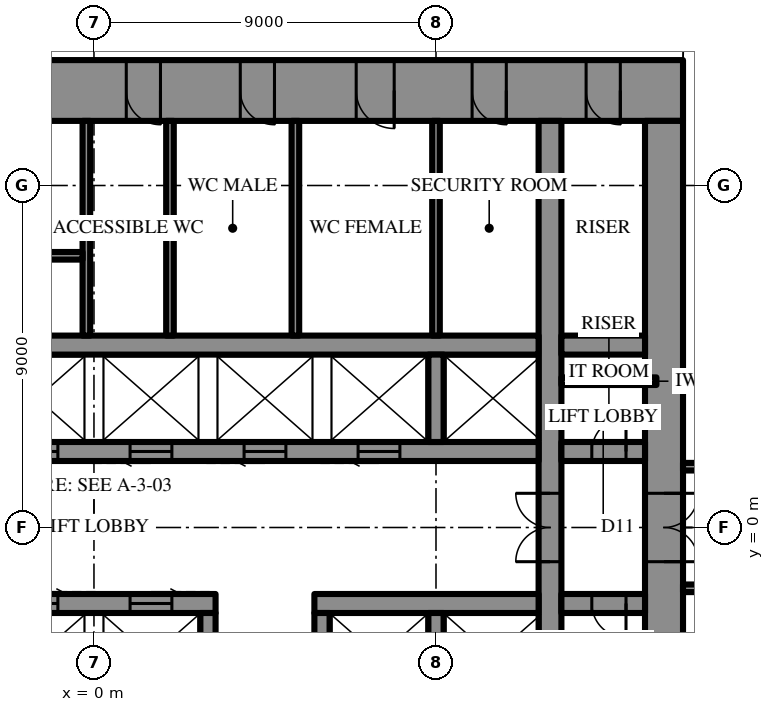
"""IFC4 building model, lengths in metres.
Left out: names, types, materials, properties, quantities, classifications, styles, units other than length and angle.
Written with IfcOpenShell. Run it as: python <this file> out.ifc"""

import sys

from ifc_helpers import new_model, si_unit, direction, frame, frame_2d, origin, place, context, subcontext, project, spatial, rectangle, extrude, element, fill, save


model = new_model("IFC4")
c1 = context("Model", 3, precision=1e-05, world=origin(), true_north=direction((0.0, 1.0)))
c2 = subcontext(c1, "Body", "Model", "MODEL_VIEW")
j1 = project(units=[si_unit("LENGTHUNIT", "METRE"), si_unit("PLANEANGLEUNIT", "RADIAN")], contexts=[c1])
p1 = place(None, origin())
s1 = spatial("IfcSite", under=j1, at=p1, CompositionType="ELEMENT")
p2 = place(p1, origin())
s2 = spatial("IfcBuilding", under=s1, at=p2, CompositionType="ELEMENT")
p3 = place(p2, frame((0.0, 0.0, 282.7)))
s3 = spatial("IfcBuildingStorey", under=s2, at=p3, CompositionType="ELEMENT", Elevation=282.7)
p4 = place(p3, frame((-15.5, 11.5, 0.0), z_axis=(0.0, 0.0, 1.0), x_axis=(1.0, 0.0, 0.0)))
e1 = element("IfcWall", 1, at=p4, inside=s3, PredefinedType="SHEAR", context=c2, shape_type="SweptSolid", body=[
    extrude(rectangle(XDim=31.0, YDim=1.6, at=frame_2d((15.5, 0.0))), origin(), (0.0, 0.0, 1.0), 4.2),
])
p5 = place(p4, frame((16.35, 0.0, 0.0)))
e2 = element("IfcOpeningElement", 2, at=p5, cuts=e1, PredefinedType="OPENING", context=c2, shape_type="SweptSolid", body=[
    extrude(rectangle(XDim=0.9, YDim=2.2, at=frame_2d((0.45, 1.1))), frame((0.0, 0.81, 0.0), z_axis=(0.0, -1.0, 0.0), x_axis=(1.0, 0.0, 0.0)), (0.0, 0.0, 1.0), 1.62),
])
p6 = place(p4, frame((19.35, 0.0, 0.0)))
e3 = element("IfcOpeningElement", 3, at=p6, cuts=e1, PredefinedType="OPENING", context=c2, shape_type="SweptSolid", body=[
    extrude(rectangle(XDim=0.9, YDim=2.2, at=frame_2d((0.45, 1.1))), frame((0.0, 0.81, 0.0), z_axis=(0.0, -1.0, 0.0), x_axis=(1.0, 0.0, 0.0)), (0.0, 0.0, 1.0), 1.62),
])
p7 = place(p4, frame((22.4, 0.0, 0.0)))
e4 = element("IfcOpeningElement", 4, at=p7, cuts=e1, PredefinedType="OPENING", context=c2, shape_type="SweptSolid", body=[
    extrude(rectangle(XDim=1.0, YDim=2.2, at=frame_2d((0.5, 1.1))), frame((0.0, 0.81, 0.0), z_axis=(0.0, -1.0, 0.0), x_axis=(1.0, 0.0, 0.0)), (0.0, 0.0, 1.0), 1.62),
])
p8 = place(p4, frame((1.65, 0.0, 0.0)))
e5 = element("IfcOpeningElement", 5, at=p8, cuts=e1, PredefinedType="OPENING", context=c2, shape_type="SweptSolid", body=[
    extrude(rectangle(XDim=0.9, YDim=2.2, at=frame_2d((0.45, 1.1))), frame((0.0, 0.81, 0.0), z_axis=(0.0, -1.0, 0.0), x_axis=(1.0, 0.0, 0.0)), (0.0, 0.0, 1.0), 1.62),
])
p9 = place(p4, frame((4.65, 0.0, 0.0)))
e6 = element("IfcOpeningElement", 6, at=p9, cuts=e1, PredefinedType="OPENING", context=c2, shape_type="SweptSolid", body=[
    extrude(rectangle(XDim=0.9, YDim=2.2, at=frame_2d((0.45, 1.1))), frame((0.0, 0.81, 0.0), z_axis=(0.0, -1.0, 0.0), x_axis=(1.0, 0.0, 0.0)), (0.0, 0.0, 1.0), 1.62),
])
p10 = place(p4, frame((25.45, 0.0, 0.0)))
e7 = element("IfcOpeningElement", 7, at=p10, cuts=e1, PredefinedType="OPENING", context=c2, shape_type="SweptSolid", body=[
    extrude(rectangle(XDim=0.9, YDim=2.2, at=frame_2d((0.45, 1.1))), frame((0.0, 0.81, 0.0), z_axis=(0.0, -1.0, 0.0), x_axis=(1.0, 0.0, 0.0)), (0.0, 0.0, 1.0), 1.62),
])
p11 = place(p4, frame((28.45, 0.0, 0.0)))
e8 = element("IfcOpeningElement", 8, at=p11, cuts=e1, PredefinedType="OPENING", context=c2, shape_type="SweptSolid", body=[
    extrude(rectangle(XDim=0.9, YDim=2.2, at=frame_2d((0.45, 1.1))), frame((0.0, 0.81, 0.0), z_axis=(0.0, -1.0, 0.0), x_axis=(1.0, 0.0, 0.0)), (0.0, 0.0, 1.0), 1.62),
])
p12 = place(p3, frame((15.0, -10.7, 0.0), z_axis=(0.0, 0.0, 1.0), x_axis=(0.0, 1.0, 0.0)))
e9 = element("IfcWall", 9, at=p12, inside=s3, PredefinedType="SHEAR", context=c2, shape_type="SweptSolid", body=[
    extrude(rectangle(XDim=21.4, YDim=1.0, at=frame_2d((10.7, 0.0))), origin(), (0.0, 0.0, 1.0), 4.2),
])
p13 = place(p12, frame((9.8, 0.0, 0.0)))
e10 = element("IfcOpeningElement", 10, at=p13, cuts=e9, PredefinedType="OPENING", context=c2, shape_type="SweptSolid", body=[
    extrude(rectangle(XDim=1.8, YDim=2.4, at=frame_2d((0.9, 1.2))), frame((0.0, 0.51, 0.0), z_axis=(0.0, -1.0, 0.0), x_axis=(1.0, 0.0, 0.0)), (0.0, 0.0, 1.0), 1.02),
])
p14 = place(p3, frame((12.0, -10.7, 0.0), z_axis=(0.0, 0.0, 1.0), x_axis=(0.0, 1.0, 0.0)))
e11 = element("IfcWall", 11, at=p14, inside=s3, PredefinedType="SHEAR", context=c2, shape_type="SweptSolid", body=[
    extrude(rectangle(XDim=21.4, YDim=0.6, at=frame_2d((10.7, 0.0))), origin(), (0.0, 0.0, 1.0), 4.2),
])
p15 = place(p14, frame((9.8, 0.0, 0.0)))
e12 = element("IfcOpeningElement", 12, at=p15, cuts=e11, PredefinedType="OPENING", context=c2, shape_type="SweptSolid", body=[
    extrude(rectangle(XDim=1.8, YDim=2.4, at=frame_2d((0.9, 1.2))), frame((0.0, 0.31, 0.0), z_axis=(0.0, -1.0, 0.0), x_axis=(1.0, 0.0, 0.0)), (0.0, 0.0, 1.0), 0.62),
])
p16 = place(p3, frame((-3.2, 2.0, 0.0), z_axis=(0.0, 0.0, 1.0), x_axis=(1.0, 0.0, 0.0)))
e13 = element("IfcWall", 13, at=p16, inside=s3, PredefinedType="SHEAR", context=c2, shape_type="SweptSolid", body=[
    extrude(rectangle(XDim=14.9, YDim=0.5, at=frame_2d((7.45, 0.0))), origin(), (0.0, 0.0, 1.0), 4.2),
])
p17 = place(p16, frame((1.15, 0.0, 0.0)))
e14 = element("IfcOpeningElement", 14, at=p17, cuts=e13, PredefinedType="OPENING", context=c2, shape_type="SweptSolid", body=[
    extrude(rectangle(XDim=1.1, YDim=2.2, at=frame_2d((0.55, 1.1))), frame((0.0, 0.26, 0.0), z_axis=(0.0, -1.0, 0.0), x_axis=(1.0, 0.0, 0.0)), (0.0, 0.0, 1.0), 0.52),
])
p18 = place(p16, frame((4.15, 0.0, 0.0)))
e15 = element("IfcOpeningElement", 15, at=p18, cuts=e13, PredefinedType="OPENING", context=c2, shape_type="SweptSolid", body=[
    extrude(rectangle(XDim=1.1, YDim=2.2, at=frame_2d((0.55, 1.1))), frame((0.0, 0.26, 0.0), z_axis=(0.0, -1.0, 0.0), x_axis=(1.0, 0.0, 0.0)), (0.0, 0.0, 1.0), 0.52),
])
p19 = place(p16, frame((7.15, 0.0, 0.0)))
e16 = element("IfcOpeningElement", 16, at=p19, cuts=e13, PredefinedType="OPENING", context=c2, shape_type="SweptSolid", body=[
    extrude(rectangle(XDim=1.1, YDim=2.2, at=frame_2d((0.55, 1.1))), frame((0.0, 0.26, 0.0), z_axis=(0.0, -1.0, 0.0), x_axis=(1.0, 0.0, 0.0)), (0.0, 0.0, 1.0), 0.52),
])
p20 = place(p16, frame((10.15, 0.0, 0.0)))
e17 = element("IfcOpeningElement", 17, at=p20, cuts=e13, PredefinedType="OPENING", context=c2, shape_type="SweptSolid", body=[
    extrude(rectangle(XDim=1.1, YDim=2.2, at=frame_2d((0.55, 1.1))), frame((0.0, 0.26, 0.0), z_axis=(0.0, -1.0, 0.0), x_axis=(1.0, 0.0, 0.0)), (0.0, 0.0, 1.0), 0.52),
])
p21 = place(p3, frame((12.3, 2.0, 0.0), z_axis=(0.0, 0.0, 1.0), x_axis=(1.0, 0.0, 0.0)))
e18 = element("IfcWall", 18, at=p21, inside=s3, PredefinedType="SHEAR", context=c2, shape_type="SweptSolid", body=[
    extrude(rectangle(XDim=2.2, YDim=0.5, at=frame_2d((1.1, 0.0))), origin(), (0.0, 0.0, 1.0), 4.2),
])
p22 = place(p21, frame((0.8, 0.0, 0.0)))
e19 = element("IfcOpeningElement", 19, at=p22, cuts=e18, PredefinedType="OPENING", context=c2, shape_type="SweptSolid", body=[
    extrude(rectangle(XDim=0.9, YDim=2.2, at=frame_2d((0.45, 1.1))), frame((0.0, 0.26, 0.0), z_axis=(0.0, -1.0, 0.0), x_axis=(1.0, 0.0, 0.0)), (0.0, 0.0, 1.0), 0.52),
])
p23 = place(p3, frame((-11.7, 4.8, 0.0), z_axis=(0.0, 0.0, 1.0), x_axis=(1.0, 0.0, 0.0)))
e20 = element("IfcWall", 20, at=p23, inside=s3, PredefinedType="SHEAR", context=c2, shape_type="SweptSolid", body=[
    extrude(rectangle(XDim=23.4, YDim=0.5, at=frame_2d((11.7, 0.0))), origin(), (0.0, 0.0, 1.0), 4.2),
])
p24 = place(p23, frame((6.6, 0.0, 0.0)))
e21 = element("IfcOpeningElement", 21, at=p24, cuts=e20, PredefinedType="OPENING", context=c2, shape_type="SweptSolid", body=[
    extrude(rectangle(XDim=1.2, YDim=2.2, at=frame_2d((0.6, 1.1))), frame((0.0, 0.26, 0.0), z_axis=(0.0, -1.0, 0.0), x_axis=(1.0, 0.0, 0.0)), (0.0, 0.0, 1.0), 0.52),
])
p25 = place(p23, frame((3.6, 0.0, 0.0)))
e22 = element("IfcOpeningElement", 22, at=p25, cuts=e20, PredefinedType="OPENING", context=c2, shape_type="SweptSolid", body=[
    extrude(rectangle(XDim=1.2, YDim=2.2, at=frame_2d((0.6, 1.1))), frame((0.0, 0.26, 0.0), z_axis=(0.0, -1.0, 0.0), x_axis=(1.0, 0.0, 0.0)), (0.0, 0.0, 1.0), 0.52),
])
p26 = place(p3, frame((12.3, 4.8, 0.0), z_axis=(0.0, 0.0, 1.0), x_axis=(1.0, 0.0, 0.0)))
e23 = element("IfcWall", 23, at=p26, inside=s3, PredefinedType="SHEAR", context=c2, shape_type="SweptSolid", body=[
    extrude(rectangle(XDim=2.2, YDim=0.5, at=frame_2d((1.1, 0.0))), origin(), (0.0, 0.0, 1.0), 4.2),
])
p27 = place(p3, frame((9.0, 2.25, 0.0), z_axis=(0.0, 0.0, 1.0), x_axis=(0.0, 1.0, 0.0)))
e24 = element("IfcWall", 24, at=p27, inside=s3, PredefinedType="SHEAR", context=c2, shape_type="SweptSolid", body=[
    extrude(rectangle(XDim=2.3, YDim=0.4, at=frame_2d((1.15, 0.0))), origin(), (0.0, 0.0, 1.0), 4.2),
])
p28 = place(p3, frame((-0.2, 5.05, 0.0), z_axis=(0.0, 0.0, 1.0), x_axis=(0.0, 1.0, 0.0)))
e25 = element("IfcWall", 25, at=p28, inside=s3, PredefinedType="SHEAR", context=c2, shape_type="SweptSolid", body=[
    extrude(rectangle(XDim=5.65, YDim=0.2, at=frame_2d((2.825, 0.0))), origin(), (0.0, 0.0, 1.0), 4.2),
])
p29 = place(p3, frame((-8.9, 7.15, 0.0), z_axis=(0.0, 0.0, 1.0), x_axis=(1.0, 0.0, 0.0)))
e26 = element("IfcWall", 26, at=p29, inside=s3, PredefinedType="SHEAR", context=c2, shape_type="SweptSolid", body=[
    extrude(rectangle(XDim=8.6, YDim=0.2, at=frame_2d((4.3, 0.0))), origin(), (0.0, 0.0, 1.0), 4.2),
])
p30 = place(p29, frame((0.3, 0.0, 0.0)))
e27 = element("IfcOpeningElement", 27, at=p30, cuts=e26, PredefinedType="OPENING", context=c2, shape_type="SweptSolid", body=[
    extrude(rectangle(XDim=1.0, YDim=2.2, at=frame_2d((0.5, 1.1))), frame((0.0, 0.11, 0.0), z_axis=(0.0, -1.0, 0.0), x_axis=(1.0, 0.0, 0.0)), (0.0, 0.0, 1.0), 0.22),
])
p31 = place(p3, frame((14.5, -2.0, 0.0), z_axis=(0.0, 0.0, 1.0), x_axis=(-1.0, 0.0, 0.0)))
e28 = element("IfcWall", 28, at=p31, inside=s3, PredefinedType="SHEAR", context=c2, shape_type="SweptSolid", body=[
    extrude(rectangle(XDim=2.2, YDim=0.5, at=frame_2d((1.1, 0.0))), origin(), (0.0, 0.0, 1.0), 4.2),
])
p32 = place(p31, frame((0.5, 0.0, 0.0)))
e29 = element("IfcOpeningElement", 29, at=p32, cuts=e28, PredefinedType="OPENING", context=c2, shape_type="SweptSolid", body=[
    extrude(rectangle(XDim=0.9, YDim=2.2, at=frame_2d((0.45, 1.1))), frame((0.0, 0.26, 0.0), z_axis=(0.0, -1.0, 0.0), x_axis=(1.0, 0.0, 0.0)), (0.0, 0.0, 1.0), 0.52),
])
p33 = place(p3, frame((11.7, -2.0, 0.0), z_axis=(0.0, 0.0, 1.0), x_axis=(-1.0, 0.0, 0.0)))
e30 = element("IfcWall", 30, at=p33, inside=s3, PredefinedType="SHEAR", context=c2, shape_type="SweptSolid", body=[
    extrude(rectangle(XDim=5.9, YDim=0.5, at=frame_2d((2.95, 0.0))), origin(), (0.0, 0.0, 1.0), 4.2),
])
p34 = place(p3, frame((3.2, -2.0, 0.0), z_axis=(0.0, 0.0, 1.0), x_axis=(-1.0, 0.0, 0.0)))
e31 = element("IfcWall", 31, at=p34, inside=s3, PredefinedType="SHEAR", context=c2, shape_type="SweptSolid", body=[
    extrude(rectangle(XDim=14.9, YDim=0.5, at=frame_2d((7.45, 0.0))), origin(), (0.0, 0.0, 1.0), 4.2),
])
p35 = place(p34, frame((1.15, 0.0, 0.0)))
e32 = element("IfcOpeningElement", 32, at=p35, cuts=e31, PredefinedType="OPENING", context=c2, shape_type="SweptSolid", body=[
    extrude(rectangle(XDim=1.1, YDim=2.2, at=frame_2d((0.55, 1.1))), frame((0.0, 0.26, 0.0), z_axis=(0.0, -1.0, 0.0), x_axis=(1.0, 0.0, 0.0)), (0.0, 0.0, 1.0), 0.52),
])
p36 = place(p34, frame((4.15, 0.0, 0.0)))
e33 = element("IfcOpeningElement", 33, at=p36, cuts=e31, PredefinedType="OPENING", context=c2, shape_type="SweptSolid", body=[
    extrude(rectangle(XDim=1.1, YDim=2.2, at=frame_2d((0.55, 1.1))), frame((0.0, 0.26, 0.0), z_axis=(0.0, -1.0, 0.0), x_axis=(1.0, 0.0, 0.0)), (0.0, 0.0, 1.0), 0.52),
])
p37 = place(p34, frame((7.15, 0.0, 0.0)))
e34 = element("IfcOpeningElement", 34, at=p37, cuts=e31, PredefinedType="OPENING", context=c2, shape_type="SweptSolid", body=[
    extrude(rectangle(XDim=1.1, YDim=2.2, at=frame_2d((0.55, 1.1))), frame((0.0, 0.26, 0.0), z_axis=(0.0, -1.0, 0.0), x_axis=(1.0, 0.0, 0.0)), (0.0, 0.0, 1.0), 0.52),
])
p38 = place(p34, frame((10.15, 0.0, 0.0)))
e35 = element("IfcOpeningElement", 35, at=p38, cuts=e31, PredefinedType="OPENING", context=c2, shape_type="SweptSolid", body=[
    extrude(rectangle(XDim=1.1, YDim=2.2, at=frame_2d((0.55, 1.1))), frame((0.0, 0.26, 0.0), z_axis=(0.0, -1.0, 0.0), x_axis=(1.0, 0.0, 0.0)), (0.0, 0.0, 1.0), 0.52),
])
for number, where, z_axis, x_axis in (
    (36, (9.0, -2.25, 0.0), (0.0, 0.0, 1.0), (0.0, -1.0, 0.0)),
    (37, (6.0, -2.25, 0.0), (0.0, 0.0, 1.0), (0.0, -1.0, 0.0)),
    (38, (3.0, -2.25, 0.0), (0.0, 0.0, 1.0), (0.0, -1.0, 0.0)),
):
    element("IfcWall", number, at=place(p3, frame(where, z_axis=z_axis, x_axis=x_axis)), inside=s3, PredefinedType="SHEAR", context=c2, shape_type="SweptSolid", body=[
        extrude(rectangle(XDim=2.3, YDim=0.4, at=frame_2d((1.15, 0.0))), origin(), (0.0, 0.0, 1.0), 4.2),
    ])
for number, where, z_axis, x_axis in (
    (39, (9.0, 5.05, 0.0), (0.0, 0.0, 1.0), (0.0, 1.0, 0.0)),
    (40, (2.0, 5.05, 0.0), (0.0, 0.0, 1.0), (0.0, 1.0, 0.0)),
    (41, (5.3, 5.05, 0.0), (0.0, 0.0, 1.0), (0.0, 1.0, 0.0)),
):
    element("IfcWall", number, at=place(p3, frame(where, z_axis=z_axis, x_axis=x_axis)), inside=s3, PredefinedType="PARTITIONING", context=c2, shape_type="SweptSolid", body=[
        extrude(rectangle(XDim=5.65, YDim=0.2, at=frame_2d((2.825, 0.0))), origin(), (0.0, 0.0, 1.0), 4.0),
    ])
p39 = place(p3, frame((12.3, 3.85, 0.0), z_axis=(0.0, 0.0, 1.0), x_axis=(1.0, 0.0, 0.0)))
e42 = element("IfcWall", 42, at=p39, inside=s3, PredefinedType="PARTITIONING", context=c2, shape_type="SweptSolid", body=[
    extrude(rectangle(XDim=2.5, YDim=0.2, at=frame_2d((1.25, 0.0))), origin(), (0.0, 0.0, 1.0), 4.0),
])
p40 = place(p3, frame((15.5, 1.6, 0.0), z_axis=(0.0, 0.0, 1.0), x_axis=(1.0, 0.0, 0.0)))
e43 = element("IfcWall", 43, at=p40, inside=s3, PredefinedType="PARTITIONING", context=c2, shape_type="SweptSolid", body=[
    extrude(rectangle(XDim=11.7, YDim=0.2, at=frame_2d((5.85, 0.0))), origin(), (0.0, 0.0, 1.0), 4.0),
])
p41 = place(p40, frame((5.35, 0.0, 0.0)))
e44 = element("IfcOpeningElement", 44, at=p41, cuts=e43, PredefinedType="OPENING", context=c2, shape_type="SweptSolid", body=[
    extrude(rectangle(XDim=1.0, YDim=2.2, at=frame_2d((0.5, 1.1))), frame((0.0, 0.11, 0.0), z_axis=(0.0, -1.0, 0.0), x_axis=(1.0, 0.0, 0.0)), (0.0, 0.0, 1.0), 0.22),
])
p42 = place(p3, frame((15.5, -1.6, 0.0), z_axis=(0.0, 0.0, 1.0), x_axis=(1.0, 0.0, 0.0)))
e45 = element("IfcWall", 45, at=p42, inside=s3, PredefinedType="PARTITIONING", context=c2, shape_type="SweptSolid", body=[
    extrude(rectangle(XDim=11.7, YDim=0.2, at=frame_2d((5.85, 0.0))), origin(), (0.0, 0.0, 1.0), 4.0),
])
p43 = place(p42, frame((5.35, 0.0, 0.0)))
e46 = element("IfcOpeningElement", 46, at=p43, cuts=e45, PredefinedType="OPENING", context=c2, shape_type="SweptSolid", body=[
    extrude(rectangle(XDim=1.0, YDim=2.2, at=frame_2d((0.5, 1.1))), frame((0.0, 0.11, 0.0), z_axis=(0.0, -1.0, 0.0), x_axis=(1.0, 0.0, 0.0)), (0.0, 0.0, 1.0), 0.22),
])
p44 = place(p13, frame((1.8, 0.0, 0.0), z_axis=(0.0, 0.0, 1.0), x_axis=(-1.0, 0.0, 0.0)))
e47 = element("IfcDoor", 47, at=p44, inside=s3, OperationType="DOUBLE_DOOR_SINGLE_SWING", PredefinedType="DOOR", context=c2, shape_type="SweptSolid", body=[
    extrude(rectangle(XDim=1.8, YDim=2.4, at=frame_2d((0.9, 1.2))), frame((0.0, 0.025, 0.0), z_axis=(0.0, -1.0, 0.0), x_axis=(1.0, 0.0, 0.0)), (0.0, 0.0, 1.0), 0.05),
])
fill(e10, e47)
p45 = place(p5, frame((0.9, 0.0, 0.0), z_axis=(0.0, 0.0, 1.0), x_axis=(-1.0, 0.0, 0.0)))
e48 = element("IfcDoor", 48, at=p45, inside=s3, OperationType="SINGLE_SWING_RIGHT", PredefinedType="DOOR", context=c2, shape_type="SweptSolid", body=[
    extrude(rectangle(XDim=0.9, YDim=2.2, at=frame_2d((0.45, 1.1))), frame((0.0, 0.025, 0.0), z_axis=(0.0, -1.0, 0.0), x_axis=(1.0, 0.0, 0.0)), (0.0, 0.0, 1.0), 0.05),
])
fill(e2, e48)
p46 = place(p6, frame((0.9, 0.0, 0.0), z_axis=(0.0, 0.0, 1.0), x_axis=(-1.0, 0.0, 0.0)))
e49 = element("IfcDoor", 49, at=p46, inside=s3, OperationType="SINGLE_SWING_RIGHT", PredefinedType="DOOR", context=c2, shape_type="SweptSolid", body=[
    extrude(rectangle(XDim=0.9, YDim=2.2, at=frame_2d((0.45, 1.1))), frame((0.0, 0.025, 0.0), z_axis=(0.0, -1.0, 0.0), x_axis=(1.0, 0.0, 0.0)), (0.0, 0.0, 1.0), 0.05),
])
fill(e3, e49)
p47 = place(p7, frame((1.0, 0.0, 0.0), z_axis=(0.0, 0.0, 1.0), x_axis=(-1.0, 0.0, 0.0)))
e50 = element("IfcDoor", 50, at=p47, inside=s3, OperationType="SINGLE_SWING_RIGHT", PredefinedType="DOOR", context=c2, shape_type="SweptSolid", body=[
    extrude(rectangle(XDim=1.0, YDim=2.2, at=frame_2d((0.5, 1.1))), frame((0.0, 0.025, 0.0), z_axis=(0.0, -1.0, 0.0), x_axis=(1.0, 0.0, 0.0)), (0.0, 0.0, 1.0), 0.05),
])
fill(e4, e50)
p48 = place(p10, frame((0.9, 0.0, 0.0), z_axis=(0.0, 0.0, 1.0), x_axis=(-1.0, 0.0, 0.0)))
e51 = element("IfcDoor", 51, at=p48, inside=s3, OperationType="SINGLE_SWING_RIGHT", PredefinedType="DOOR", context=c2, shape_type="SweptSolid", body=[
    extrude(rectangle(XDim=0.9, YDim=2.2, at=frame_2d((0.45, 1.1))), frame((0.0, 0.025, 0.0), z_axis=(0.0, -1.0, 0.0), x_axis=(1.0, 0.0, 0.0)), (0.0, 0.0, 1.0), 0.05),
])
fill(e7, e51)
p49 = place(p11, frame((0.9, 0.0, 0.0), z_axis=(0.0, 0.0, 1.0), x_axis=(-1.0, 0.0, 0.0)))
e52 = element("IfcDoor", 52, at=p49, inside=s3, OperationType="SINGLE_SWING_RIGHT", PredefinedType="DOOR", context=c2, shape_type="SweptSolid", body=[
    extrude(rectangle(XDim=0.9, YDim=2.2, at=frame_2d((0.45, 1.1))), frame((0.0, 0.025, 0.0), z_axis=(0.0, -1.0, 0.0), x_axis=(1.0, 0.0, 0.0)), (0.0, 0.0, 1.0), 0.05),
])
fill(e8, e52)
p50 = place(p22, origin())
e53 = element("IfcDoor", 53, at=p50, inside=s3, OperationType="SINGLE_SWING_LEFT", PredefinedType="DOOR", context=c2, shape_type="SweptSolid", body=[
    extrude(rectangle(XDim=0.9, YDim=2.2, at=frame_2d((0.45, 1.1))), frame((0.0, 0.025, 0.0), z_axis=(0.0, -1.0, 0.0), x_axis=(1.0, 0.0, 0.0)), (0.0, 0.0, 1.0), 0.05),
])
fill(e19, e53)
p51 = place(p32, origin())
e54 = element("IfcDoor", 54, at=p51, inside=s3, OperationType="SINGLE_SWING_RIGHT", PredefinedType="DOOR", context=c2, shape_type="SweptSolid", body=[
    extrude(rectangle(XDim=0.9, YDim=2.2, at=frame_2d((0.45, 1.1))), frame((0.0, 0.025, 0.0), z_axis=(0.0, -1.0, 0.0), x_axis=(1.0, 0.0, 0.0)), (0.0, 0.0, 1.0), 0.05),
])
fill(e29, e54)
p52 = place(p15, origin())
e55 = element("IfcDoor", 55, at=p52, inside=s3, OperationType="DOUBLE_DOOR_SINGLE_SWING", PredefinedType="DOOR", context=c2, shape_type="SweptSolid", body=[
    extrude(rectangle(XDim=1.8, YDim=2.4, at=frame_2d((0.9, 1.2))), frame((0.0, 0.025, 0.0), z_axis=(0.0, -1.0, 0.0), x_axis=(1.0, 0.0, 0.0)), (0.0, 0.0, 1.0), 0.05),
])
fill(e12, e55)
p53 = place(p17, frame((1.1, 0.0, 0.0), z_axis=(0.0, 0.0, 1.0), x_axis=(-1.0, 0.0, 0.0)))
e56 = element("IfcDoor", 56, at=p53, inside=s3, OperationType="SLIDING_TO_LEFT", PredefinedType="DOOR", context=c2, shape_type="SweptSolid", body=[
    extrude(rectangle(XDim=1.1, YDim=2.2, at=frame_2d((0.55, 1.1))), frame((0.0, 0.025, 0.0), z_axis=(0.0, -1.0, 0.0), x_axis=(1.0, 0.0, 0.0)), (0.0, 0.0, 1.0), 0.05),
])
fill(e14, e56)
p54 = place(p18, frame((1.1, 0.0, 0.0), z_axis=(0.0, 0.0, 1.0), x_axis=(-1.0, 0.0, 0.0)))
e57 = element("IfcDoor", 57, at=p54, inside=s3, OperationType="SLIDING_TO_LEFT", PredefinedType="DOOR", context=c2, shape_type="SweptSolid", body=[
    extrude(rectangle(XDim=1.1, YDim=2.2, at=frame_2d((0.55, 1.1))), frame((0.0, 0.025, 0.0), z_axis=(0.0, -1.0, 0.0), x_axis=(1.0, 0.0, 0.0)), (0.0, 0.0, 1.0), 0.05),
])
fill(e15, e57)
p55 = place(p19, frame((1.1, 0.0, 0.0), z_axis=(0.0, 0.0, 1.0), x_axis=(-1.0, 0.0, 0.0)))
e58 = element("IfcDoor", 58, at=p55, inside=s3, OperationType="SLIDING_TO_LEFT", PredefinedType="DOOR", context=c2, shape_type="SweptSolid", body=[
    extrude(rectangle(XDim=1.1, YDim=2.2, at=frame_2d((0.55, 1.1))), frame((0.0, 0.025, 0.0), z_axis=(0.0, -1.0, 0.0), x_axis=(1.0, 0.0, 0.0)), (0.0, 0.0, 1.0), 0.05),
])
fill(e16, e58)
p56 = place(p20, frame((1.1, 0.0, 0.0), z_axis=(0.0, 0.0, 1.0), x_axis=(-1.0, 0.0, 0.0)))
e59 = element("IfcDoor", 59, at=p56, inside=s3, OperationType="SLIDING_TO_LEFT", PredefinedType="DOOR", context=c2, shape_type="SweptSolid", body=[
    extrude(rectangle(XDim=1.1, YDim=2.2, at=frame_2d((0.55, 1.1))), frame((0.0, 0.025, 0.0), z_axis=(0.0, -1.0, 0.0), x_axis=(1.0, 0.0, 0.0)), (0.0, 0.0, 1.0), 0.05),
])
fill(e17, e59)
p57 = place(p35, frame((1.1, 0.0, 0.0), z_axis=(0.0, 0.0, 1.0), x_axis=(-1.0, 0.0, 0.0)))
e60 = element("IfcDoor", 60, at=p57, inside=s3, OperationType="SLIDING_TO_LEFT", PredefinedType="DOOR", context=c2, shape_type="SweptSolid", body=[
    extrude(rectangle(XDim=1.1, YDim=2.2, at=frame_2d((0.55, 1.1))), frame((0.0, 0.025, 0.0), z_axis=(0.0, -1.0, 0.0), x_axis=(1.0, 0.0, 0.0)), (0.0, 0.0, 1.0), 0.05),
])
fill(e32, e60)
p58 = place(p36, frame((1.1, 0.0, 0.0), z_axis=(0.0, 0.0, 1.0), x_axis=(-1.0, 0.0, 0.0)))
e61 = element("IfcDoor", 61, at=p58, inside=s3, OperationType="SLIDING_TO_LEFT", PredefinedType="DOOR", context=c2, shape_type="SweptSolid", body=[
    extrude(rectangle(XDim=1.1, YDim=2.2, at=frame_2d((0.55, 1.1))), frame((0.0, 0.025, 0.0), z_axis=(0.0, -1.0, 0.0), x_axis=(1.0, 0.0, 0.0)), (0.0, 0.0, 1.0), 0.05),
])
fill(e33, e61)
save(model, sys.argv[1])
